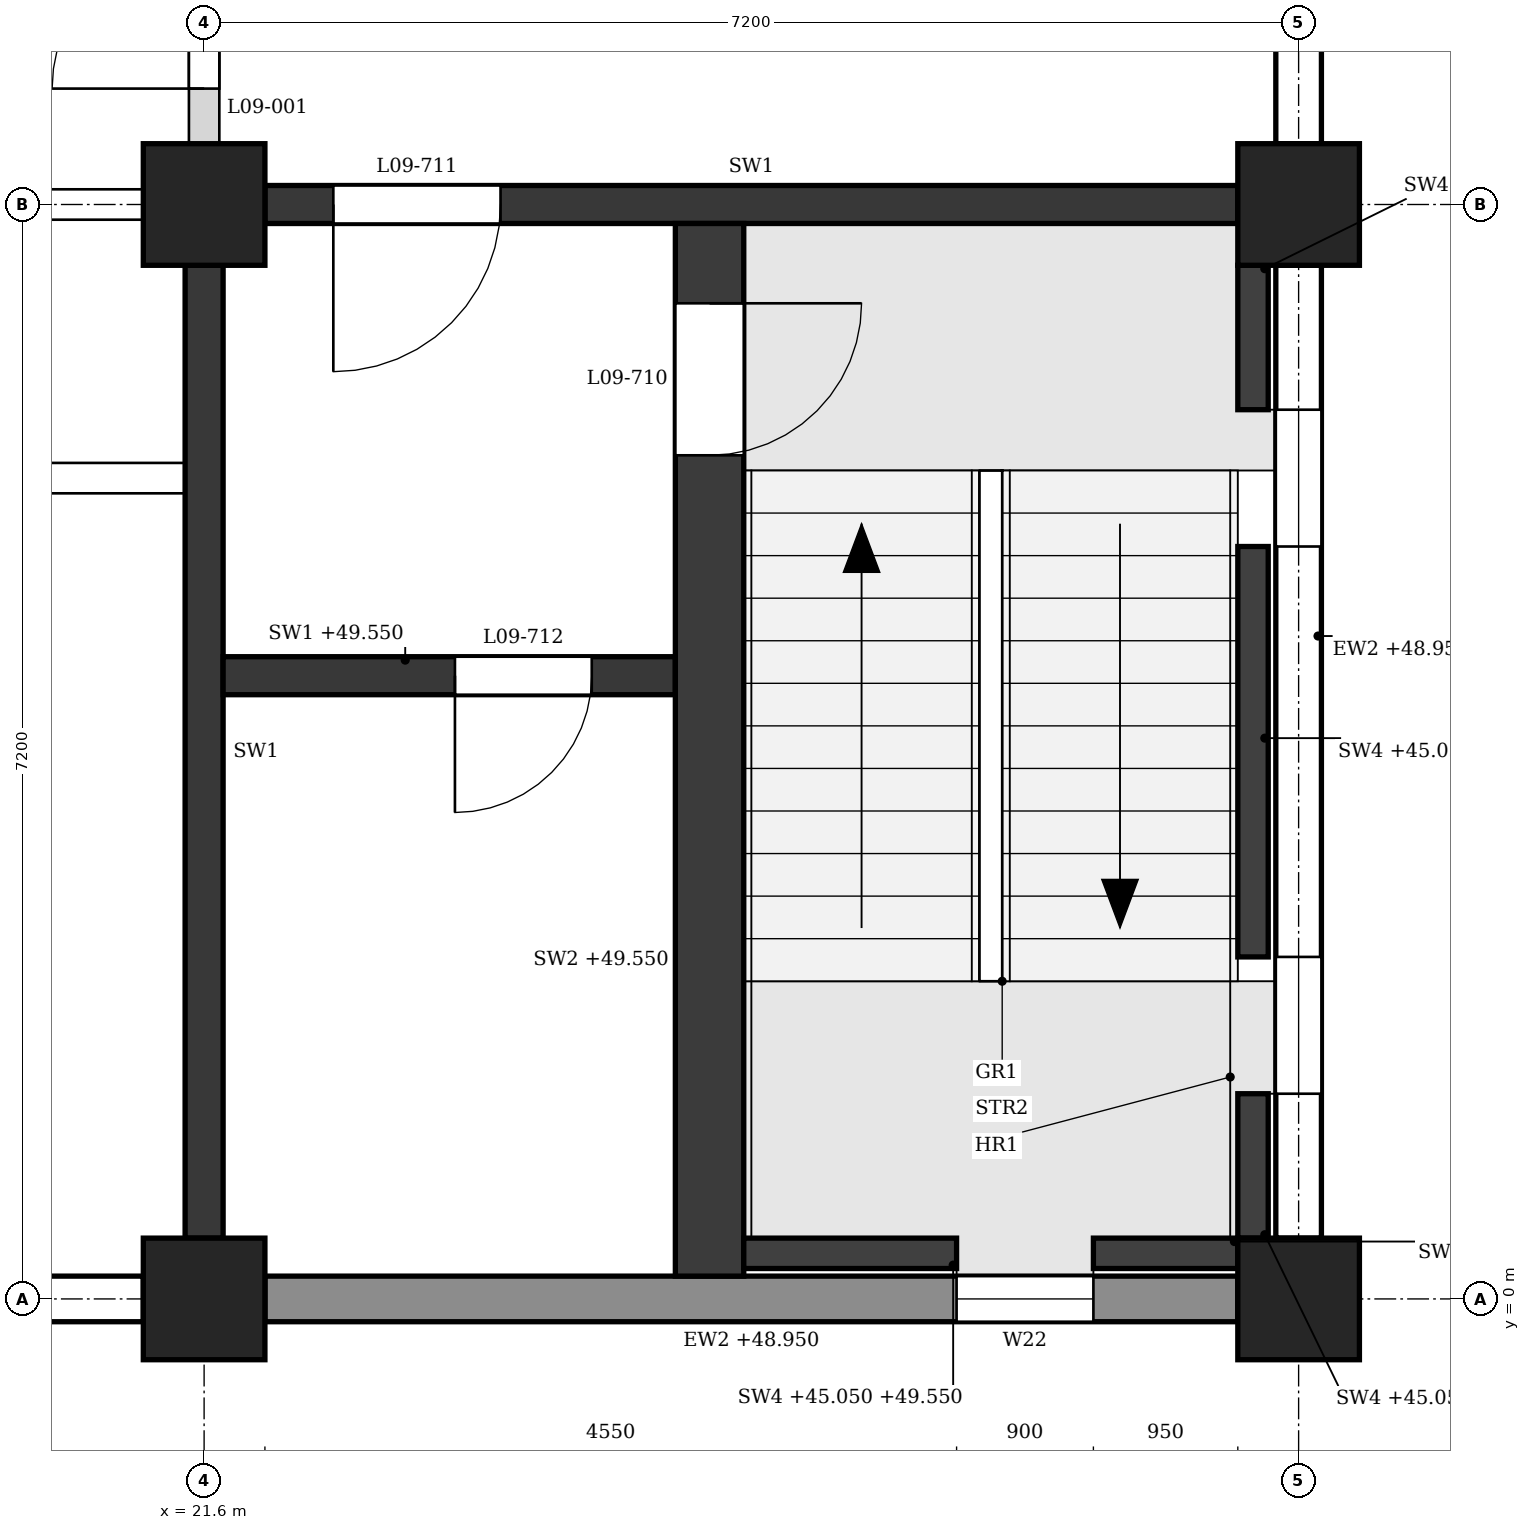
"""IFC4 building model, lengths in metres.
Left out: names, types, materials, properties, quantities, classifications, styles, units other than length and angle.
Written with IfcOpenShell. Run it as: python <this file> out.ifc"""

import sys

from ifc_helpers import new_model, si_unit, direction, frame, frame_2d, origin, origin_2d, place, context, subcontext, project, spatial, polyline, rectangle, outline, extrude, element, fill, save


model = new_model("IFC4")
c1 = context("Model", 3, precision=1e-05, world=origin(), true_north=direction((0.0, 1.0)))
c2 = subcontext(c1, "Body", "Model", "MODEL_VIEW")
j1 = project(units=[si_unit("LENGTHUNIT", "METRE"), si_unit("PLANEANGLEUNIT", "RADIAN")], contexts=[c1])
p1 = place(None, origin())
s1 = spatial("IfcSite", under=j1, at=p1, CompositionType="ELEMENT")
p2 = place(p1, origin())
s2 = spatial("IfcBuilding", under=s1, at=p2, CompositionType="ELEMENT")
p3 = place(p2, frame((0.0, 0.0, 45.3)))
s3 = spatial("IfcBuildingStorey", under=s2, at=p3, CompositionType="ELEMENT", Elevation=45.3)
for number, where, z_axis, x_axis in (
    (1, (21.6, 0.0, 0.0), (0.0, 0.0, 1.0), (1.0, 0.0, 0.0)),
    (2, (21.6, 7.2, 0.0), (0.0, 0.0, 1.0), (1.0, 0.0, 0.0)),
    (3, (28.8, 0.0, 0.0), (0.0, 0.0, 1.0), (1.0, 0.0, 0.0)),
    (4, (28.8, 7.2, 0.0), (0.0, 0.0, 1.0), (1.0, 0.0, 0.0)),
):
    element("IfcColumn", number, at=place(p3, frame(where, z_axis=z_axis, x_axis=x_axis)), inside=s3, PredefinedType="COLUMN", context=c2, shape_type="SweptSolid", body=[
        extrude(rectangle(XDim=0.8, YDim=0.8, at=origin_2d()), origin(), (0.0, 0.0, 1.0), 4.5),
    ])
p4 = place(p3, frame((14.8, 0.0, 0.0), z_axis=(0.0, 0.0, 1.0), x_axis=(1.0, 0.0, 0.0)))
e5 = element("IfcWall", 5, at=p4, inside=s3, PredefinedType="STANDARD", context=c2, shape_type="SweptSolid", body=[
    extrude(rectangle(XDim=6.4, YDim=0.3, at=frame_2d((3.2, 0.0))), origin(), (0.0, 0.0, 1.0), 3.65),
])
p5 = place(p4, frame((0.65, 0.0, 0.9)))
e6 = element("IfcOpeningElement", 6, at=p5, cuts=e5, PredefinedType="OPENING", context=c2, shape_type="SweptSolid", body=[
    extrude(outline(polyline([(0.0, 0.0), (1.5, 0.0), (1.5, 1.95), (0.75, 2.7), (0.0, 1.95), (0.0, 0.0)])), frame((0.0, 0.16, 0.0), z_axis=(0.0, -1.0, 0.0), x_axis=(1.0, 0.0, 0.0)), (0.0, 0.0, 1.0), 0.32),
])
p6 = place(p4, frame((4.25, 0.0, 0.9)))
e7 = element("IfcOpeningElement", 7, at=p6, cuts=e5, PredefinedType="OPENING", context=c2, shape_type="SweptSolid", body=[
    extrude(outline(polyline([(0.0, 0.0), (1.5, 0.0), (1.5, 1.95), (0.75, 2.7), (0.0, 1.95), (0.0, 0.0)])), frame((0.0, 0.16, 0.0), z_axis=(0.0, -1.0, 0.0), x_axis=(1.0, 0.0, 0.0)), (0.0, 0.0, 1.0), 0.32),
])
p7 = place(p3, frame((22.0, 0.0, 0.0), z_axis=(0.0, 0.0, 1.0), x_axis=(1.0, 0.0, 0.0)))
e8 = element("IfcWall", 8, at=p7, inside=s3, PredefinedType="STANDARD", context=c2, shape_type="SweptSolid", body=[
    extrude(rectangle(XDim=6.4, YDim=0.3, at=frame_2d((3.2, 0.0))), origin(), (0.0, 0.0, 1.0), 3.65),
])
p8 = place(p7, frame((4.55, 0.0, 0.9)))
e9 = element("IfcOpeningElement", 9, at=p8, cuts=e8, PredefinedType="OPENING", context=c2, shape_type="SweptSolid", body=[
    extrude(outline(polyline([(0.0, 0.0), (0.9, 0.0), (0.9, 2.25), (0.45, 2.7), (0.0, 2.25), (0.0, 0.0)])), frame((0.0, 0.16, 0.0), z_axis=(0.0, -1.0, 0.0), x_axis=(1.0, 0.0, 0.0)), (0.0, 0.0, 1.0), 0.32),
])
p9 = place(p3, frame((28.8, 0.4, 0.0), z_axis=(0.0, 0.0, 1.0), x_axis=(0.0, 1.0, 0.0)))
e10 = element("IfcWall", 10, at=p9, inside=s3, PredefinedType="STANDARD", context=c2, shape_type="SweptSolid", body=[
    extrude(rectangle(XDim=6.4, YDim=0.3, at=frame_2d((3.2, 0.0))), origin(), (0.0, 0.0, 1.0), 3.65),
])
p10 = place(p9, frame((0.95, 0.0, 0.9)))
e11 = element("IfcOpeningElement", 11, at=p10, cuts=e10, PredefinedType="OPENING", context=c2, shape_type="SweptSolid", body=[
    extrude(outline(polyline([(0.0, 0.0), (0.9, 0.0), (0.9, 2.25), (0.45, 2.7), (0.0, 2.25), (0.0, 0.0)])), frame((0.0, 0.16, 0.0), z_axis=(0.0, -1.0, 0.0), x_axis=(1.0, 0.0, 0.0)), (0.0, 0.0, 1.0), 0.32),
])
p11 = place(p9, frame((4.55, 0.0, 0.9)))
e12 = element("IfcOpeningElement", 12, at=p11, cuts=e10, PredefinedType="OPENING", context=c2, shape_type="SweptSolid", body=[
    extrude(outline(polyline([(0.0, 0.0), (0.9, 0.0), (0.9, 2.25), (0.45, 2.7), (0.0, 2.25), (0.0, 0.0)])), frame((0.0, 0.16, 0.0), z_axis=(0.0, -1.0, 0.0), x_axis=(1.0, 0.0, 0.0)), (0.0, 0.0, 1.0), 0.32),
])
p12 = place(p3, frame((28.8, 7.6, 0.0), z_axis=(0.0, 0.0, 1.0), x_axis=(0.0, 1.0, 0.0)))
e13 = element("IfcWall", 13, at=p12, inside=s3, PredefinedType="STANDARD", context=c2, shape_type="SweptSolid", body=[
    extrude(rectangle(XDim=6.4, YDim=0.3, at=frame_2d((3.2, 0.0))), origin(), (0.0, 0.0, 1.0), 3.65),
])
p13 = place(p12, frame((0.65, 0.0, 0.9)))
e14 = element("IfcOpeningElement", 14, at=p13, cuts=e13, PredefinedType="OPENING", context=c2, shape_type="SweptSolid", body=[
    extrude(outline(polyline([(0.0, 0.0), (1.5, 0.0), (1.5, 1.95), (0.75, 2.7), (0.0, 1.95), (0.0, 0.0)])), frame((0.0, 0.16, 0.0), z_axis=(0.0, -1.0, 0.0), x_axis=(1.0, 0.0, 0.0)), (0.0, 0.0, 1.0), 0.32),
])
p14 = place(p3, frame((22.0, 7.2, 0.0), z_axis=(0.0, 0.0, 1.0), x_axis=(1.0, 0.0, 0.0)))
e15 = element("IfcWall", 15, at=p14, inside=s3, PredefinedType="SHEAR", context=c2, shape_type="SweptSolid", body=[
    extrude(rectangle(XDim=6.4, YDim=0.25, at=frame_2d((3.2, 0.0))), origin(), (0.0, 0.0, 1.0), 3.55),
])
p15 = place(p14, frame((0.45, 0.0, 0.0)))
e16 = element("IfcOpeningElement", 16, at=p15, cuts=e15, PredefinedType="OPENING", context=c2, shape_type="SweptSolid", body=[
    extrude(rectangle(XDim=1.1, YDim=2.1, at=frame_2d((0.55, 1.05))), frame((0.0, 0.135, 0.0), z_axis=(0.0, -1.0, 0.0), x_axis=(1.0, 0.0, 0.0)), (0.0, 0.0, 1.0), 0.27),
])
p16 = place(p3, frame((21.6, 0.4, 0.0), z_axis=(0.0, 0.0, 1.0), x_axis=(0.0, 1.0, 0.0)))
e17 = element("IfcWall", 17, at=p16, inside=s3, PredefinedType="SHEAR", context=c2, shape_type="SweptSolid", body=[
    extrude(rectangle(XDim=6.4, YDim=0.25, at=frame_2d((3.2, 0.0))), origin(), (0.0, 0.0, 1.0), 3.55),
])
p17 = place(p3, frame((28.5, 0.4, -0.25), z_axis=(0.0, 0.0, 1.0), x_axis=(0.0, 1.0, 0.0)))
e18 = element("IfcWall", 18, at=p17, inside=s3, PredefinedType="SHEAR", context=c2, shape_type="SweptSolid", body=[
    extrude(rectangle(XDim=0.95, YDim=0.2, at=frame_2d((0.475, 0.0))), origin(), (0.0, 0.0, 1.0), 4.5),
])
p18 = place(p3, frame((28.5, 2.25, -0.25), z_axis=(0.0, 0.0, 1.0), x_axis=(0.0, 1.0, 0.0)))
e19 = element("IfcWall", 19, at=p18, inside=s3, PredefinedType="SHEAR", context=c2, shape_type="SweptSolid", body=[
    extrude(rectangle(XDim=2.7, YDim=0.2, at=frame_2d((1.35, 0.0))), origin(), (0.0, 0.0, 1.0), 4.5),
])
p19 = place(p3, frame((28.5, 5.85, -0.25), z_axis=(0.0, 0.0, 1.0), x_axis=(0.0, 1.0, 0.0)))
e20 = element("IfcWall", 20, at=p19, inside=s3, PredefinedType="SHEAR", context=c2, shape_type="SweptSolid", body=[
    extrude(rectangle(XDim=0.95, YDim=0.2, at=frame_2d((0.475, 0.0))), origin(), (0.0, 0.0, 1.0), 4.5),
])
p20 = place(p3, frame((25.15, 0.3, -0.25), z_axis=(0.0, 0.0, 1.0), x_axis=(1.0, 0.0, 0.0)))
e21 = element("IfcWall", 21, at=p20, inside=s3, PredefinedType="SHEAR", context=c2, shape_type="SweptSolid", body=[
    extrude(rectangle(XDim=1.4, YDim=0.2, at=frame_2d((0.7, 0.0))), origin(), (0.0, 0.0, 1.0), 4.5),
])
p21 = place(p3, frame((27.45, 0.3, -0.25), z_axis=(0.0, 0.0, 1.0), x_axis=(1.0, 0.0, 0.0)))
e22 = element("IfcWall", 22, at=p21, inside=s3, PredefinedType="SHEAR", context=c2, shape_type="SweptSolid", body=[
    extrude(rectangle(XDim=0.95, YDim=0.2, at=frame_2d((0.475, 0.0))), origin(), (0.0, 0.0, 1.0), 4.5),
])
p22 = place(p3, frame((24.925, 0.15, 0.0), z_axis=(0.0, 0.0, 1.0), x_axis=(0.0, 1.0, 0.0)))
e23 = element("IfcWall", 23, at=p22, inside=s3, PredefinedType="SHEAR", context=c2, shape_type="SweptSolid", body=[
    extrude(rectangle(XDim=6.925, YDim=0.45, at=frame_2d((3.462, 0.0))), origin(), (0.0, 0.0, 1.0), 4.25),
])
p23 = place(p22, frame((5.4, 0.0, 0.0)))
e24 = element("IfcOpeningElement", 24, at=p23, cuts=e23, PredefinedType="OPENING", context=c2, shape_type="SweptSolid", body=[
    extrude(rectangle(XDim=1.0, YDim=2.1, at=frame_2d((0.5, 1.05))), frame((0.0, 0.235, 0.0), z_axis=(0.0, -1.0, 0.0), x_axis=(1.0, 0.0, 0.0)), (0.0, 0.0, 1.0), 0.47),
])
p24 = place(p3, frame((21.725, 4.1, 0.0), z_axis=(0.0, 0.0, 1.0), x_axis=(1.0, 0.0, 0.0)))
e25 = element("IfcWall", 25, at=p24, inside=s3, PredefinedType="SHEAR", context=c2, shape_type="SweptSolid", body=[
    extrude(rectangle(XDim=2.975, YDim=0.25, at=frame_2d((1.487, 0.0))), origin(), (0.0, 0.0, 1.0), 4.25),
])
p25 = place(p24, frame((1.525, 0.0, 0.0)))
e26 = element("IfcOpeningElement", 26, at=p25, cuts=e25, PredefinedType="OPENING", context=c2, shape_type="SweptSolid", body=[
    extrude(rectangle(XDim=0.9, YDim=2.1, at=frame_2d((0.45, 1.05))), frame((0.0, 0.135, 0.0), z_axis=(0.0, -1.0, 0.0), x_axis=(1.0, 0.0, 0.0)), (0.0, 0.0, 1.0), 0.27),
])
p26 = place(p3, frame((7.325, 5.4, 0.0), z_axis=(0.0, 0.0, 1.0), x_axis=(1.0, 0.0, 0.0)))
e27 = element("IfcWall", 27, at=p26, inside=s3, PredefinedType="PARTITIONING", context=c2, shape_type="SweptSolid", body=[
    extrude(outline(polyline([(0.0, 0.0), (14.15, 0.0), (14.15, 3.55), (14.05, 3.55), (14.05, 4.25), (7.3, 4.25), (7.3, 3.55), (6.85, 3.55), (6.85, 4.25), (0.1, 4.25), (0.1, 3.55), (0.0, 3.55), (0.0, 0.0)])), frame((0.0, 0.1, 0.0), z_axis=(0.0, -1.0, 0.0), x_axis=(1.0, 0.0, 0.0)), (0.0, 0.0, 1.0), 0.2),
])
p27 = place(p26, frame((1.238, 0.0, 0.0)))
e28 = element("IfcOpeningElement", 28, at=p27, cuts=e27, PredefinedType="OPENING", context=c2, shape_type="SweptSolid", body=[
    extrude(rectangle(XDim=1.0, YDim=2.1, at=frame_2d((0.5, 1.05))), frame((0.0, 0.11, 0.0), z_axis=(0.0, -1.0, 0.0), x_axis=(1.0, 0.0, 0.0)), (0.0, 0.0, 1.0), 0.22),
])
p28 = place(p26, frame((4.775, 0.0, 0.0)))
e29 = element("IfcOpeningElement", 29, at=p28, cuts=e27, PredefinedType="OPENING", context=c2, shape_type="SweptSolid", body=[
    extrude(rectangle(XDim=1.0, YDim=2.1, at=frame_2d((0.5, 1.05))), frame((0.0, 0.11, 0.0), z_axis=(0.0, -1.0, 0.0), x_axis=(1.0, 0.0, 0.0)), (0.0, 0.0, 1.0), 0.22),
])
p29 = place(p26, frame((8.375, 0.0, 0.0)))
e30 = element("IfcOpeningElement", 30, at=p29, cuts=e27, PredefinedType="OPENING", context=c2, shape_type="SweptSolid", body=[
    extrude(rectangle(XDim=1.0, YDim=2.1, at=frame_2d((0.5, 1.05))), frame((0.0, 0.11, 0.0), z_axis=(0.0, -1.0, 0.0), x_axis=(1.0, 0.0, 0.0)), (0.0, 0.0, 1.0), 0.22),
])
p30 = place(p26, frame((11.913, 0.0, 0.0)))
e31 = element("IfcOpeningElement", 31, at=p30, cuts=e27, PredefinedType="OPENING", context=c2, shape_type="SweptSolid", body=[
    extrude(rectangle(XDim=1.0, YDim=2.1, at=frame_2d((0.5, 1.05))), frame((0.0, 0.11, 0.0), z_axis=(0.0, -1.0, 0.0), x_axis=(1.0, 0.0, 0.0)), (0.0, 0.0, 1.0), 0.22),
])
p31 = place(p3, frame((14.8, 7.2, 0.0), z_axis=(0.0, 0.0, 1.0), x_axis=(1.0, 0.0, 0.0)))
e32 = element("IfcWall", 32, at=p31, inside=s3, PredefinedType="PARTITIONING", context=c2, shape_type="SweptSolid", body=[
    extrude(rectangle(XDim=6.4, YDim=0.2, at=frame_2d((3.2, 0.0))), origin(), (0.0, 0.0, 1.0), 3.55),
])
p32 = place(p31, frame((4.3, 0.0, 0.0)))
e33 = element("IfcOpeningElement", 33, at=p32, cuts=e32, PredefinedType="OPENING", context=c2, shape_type="SweptSolid", body=[
    extrude(rectangle(XDim=1.0, YDim=2.1, at=frame_2d((0.5, 1.05))), frame((0.0, 0.11, 0.0), z_axis=(0.0, -1.0, 0.0), x_axis=(1.0, 0.0, 0.0)), (0.0, 0.0, 1.0), 0.22),
])
p33 = place(p3, frame((21.6, 7.6, 0.0), z_axis=(0.0, 0.0, 1.0), x_axis=(0.0, 1.0, 0.0)))
e34 = element("IfcWall", 34, at=p33, inside=s3, PredefinedType="PARTITIONING", context=c2, shape_type="SweptSolid", body=[
    extrude(rectangle(XDim=2.725, YDim=0.2, at=frame_2d((1.362, 0.0))), origin(), (0.0, 0.0, 1.0), 3.55),
])
p34 = place(p33, frame((0.362, 0.0, 0.0)))
e35 = element("IfcOpeningElement", 35, at=p34, cuts=e34, PredefinedType="OPENING", context=c2, shape_type="SweptSolid", body=[
    extrude(rectangle(XDim=2.0, YDim=2.4, at=frame_2d((1.0, 1.2))), frame((0.0, 0.11, 0.0), z_axis=(0.0, -1.0, 0.0), x_axis=(1.0, 0.0, 0.0)), (0.0, 0.0, 1.0), 0.22),
])
p35 = place(p10, origin())
e36 = element("IfcWindow", 36, at=p35, inside=s3, PartitioningType="SINGLE_PANEL", PredefinedType="WINDOW", context=c2, shape_type="SweptSolid", body=[
    extrude(outline(polyline([(0.0, 0.0), (0.9, 0.0), (0.9, 2.25), (0.45, 2.7), (0.0, 2.25), (0.0, 0.0)])), frame((0.0, 0.03, 0.0), z_axis=(0.0, -1.0, 0.0), x_axis=(1.0, 0.0, 0.0)), (0.0, 0.0, 1.0), 0.06),
])
fill(e11, e36)
p36 = place(p11, origin())
e37 = element("IfcWindow", 37, at=p36, inside=s3, PartitioningType="SINGLE_PANEL", PredefinedType="WINDOW", context=c2, shape_type="SweptSolid", body=[
    extrude(outline(polyline([(0.0, 0.0), (0.9, 0.0), (0.9, 2.25), (0.45, 2.7), (0.0, 2.25), (0.0, 0.0)])), frame((0.0, 0.03, 0.0), z_axis=(0.0, -1.0, 0.0), x_axis=(1.0, 0.0, 0.0)), (0.0, 0.0, 1.0), 0.06),
])
fill(e12, e37)
p37 = place(p8, origin())
e38 = element("IfcWindow", 38, at=p37, inside=s3, PartitioningType="SINGLE_PANEL", PredefinedType="WINDOW", context=c2, shape_type="SweptSolid", body=[
    extrude(outline(polyline([(0.0, 0.0), (0.9, 0.0), (0.9, 2.25), (0.45, 2.7), (0.0, 2.25), (0.0, 0.0)])), frame((0.0, 0.03, 0.0), z_axis=(0.0, -1.0, 0.0), x_axis=(1.0, 0.0, 0.0)), (0.0, 0.0, 1.0), 0.06),
])
fill(e9, e38)
p38 = place(p23, frame((1.0, 0.0, 0.0), z_axis=(0.0, 0.0, 1.0), x_axis=(-1.0, 0.0, 0.0)))
e39 = element("IfcDoor", 39, at=p38, inside=s3, OperationType="SINGLE_SWING_LEFT", PredefinedType="DOOR", context=c2, shape_type="SweptSolid", body=[
    extrude(rectangle(XDim=1.0, YDim=2.1, at=frame_2d((0.5, 1.05))), frame((0.0, 0.025, 0.0), z_axis=(0.0, -1.0, 0.0), x_axis=(1.0, 0.0, 0.0)), (0.0, 0.0, 1.0), 0.05),
])
fill(e24, e39)
p39 = place(p15, frame((1.1, 0.0, 0.0), z_axis=(0.0, 0.0, 1.0), x_axis=(-1.0, 0.0, 0.0)))
e40 = element("IfcDoor", 40, at=p39, inside=s3, OperationType="SINGLE_SWING_RIGHT", PredefinedType="DOOR", context=c2, shape_type="SweptSolid", body=[
    extrude(rectangle(XDim=1.1, YDim=2.1, at=frame_2d((0.55, 1.05))), frame((0.0, 0.025, 0.0), z_axis=(0.0, -1.0, 0.0), x_axis=(1.0, 0.0, 0.0)), (0.0, 0.0, 1.0), 0.05),
])
fill(e16, e40)
p40 = place(p25, frame((0.9, 0.0, 0.0), z_axis=(0.0, 0.0, 1.0), x_axis=(-1.0, 0.0, 0.0)))
e41 = element("IfcDoor", 41, at=p40, inside=s3, OperationType="SINGLE_SWING_RIGHT", PredefinedType="DOOR", context=c2, shape_type="SweptSolid", body=[
    extrude(rectangle(XDim=0.9, YDim=2.1, at=frame_2d((0.45, 1.05))), frame((0.0, 0.025, 0.0), z_axis=(0.0, -1.0, 0.0), x_axis=(1.0, 0.0, 0.0)), (0.0, 0.0, 1.0), 0.05),
])
fill(e26, e41)
p41 = place(p34, origin())
e42 = element("IfcDoor", 42, at=p41, inside=s3, OperationType="DOUBLE_DOOR_SINGLE_SWING", PredefinedType="DOOR", context=c2, shape_type="SweptSolid", body=[
    extrude(rectangle(XDim=2.0, YDim=2.4, at=frame_2d((1.0, 1.2))), frame((0.0, 0.025, 0.0), z_axis=(0.0, -1.0, 0.0), x_axis=(1.0, 0.0, 0.0)), (0.0, 0.0, 1.0), 0.05),
])
fill(e35, e42)
save(model, sys.argv[1])
